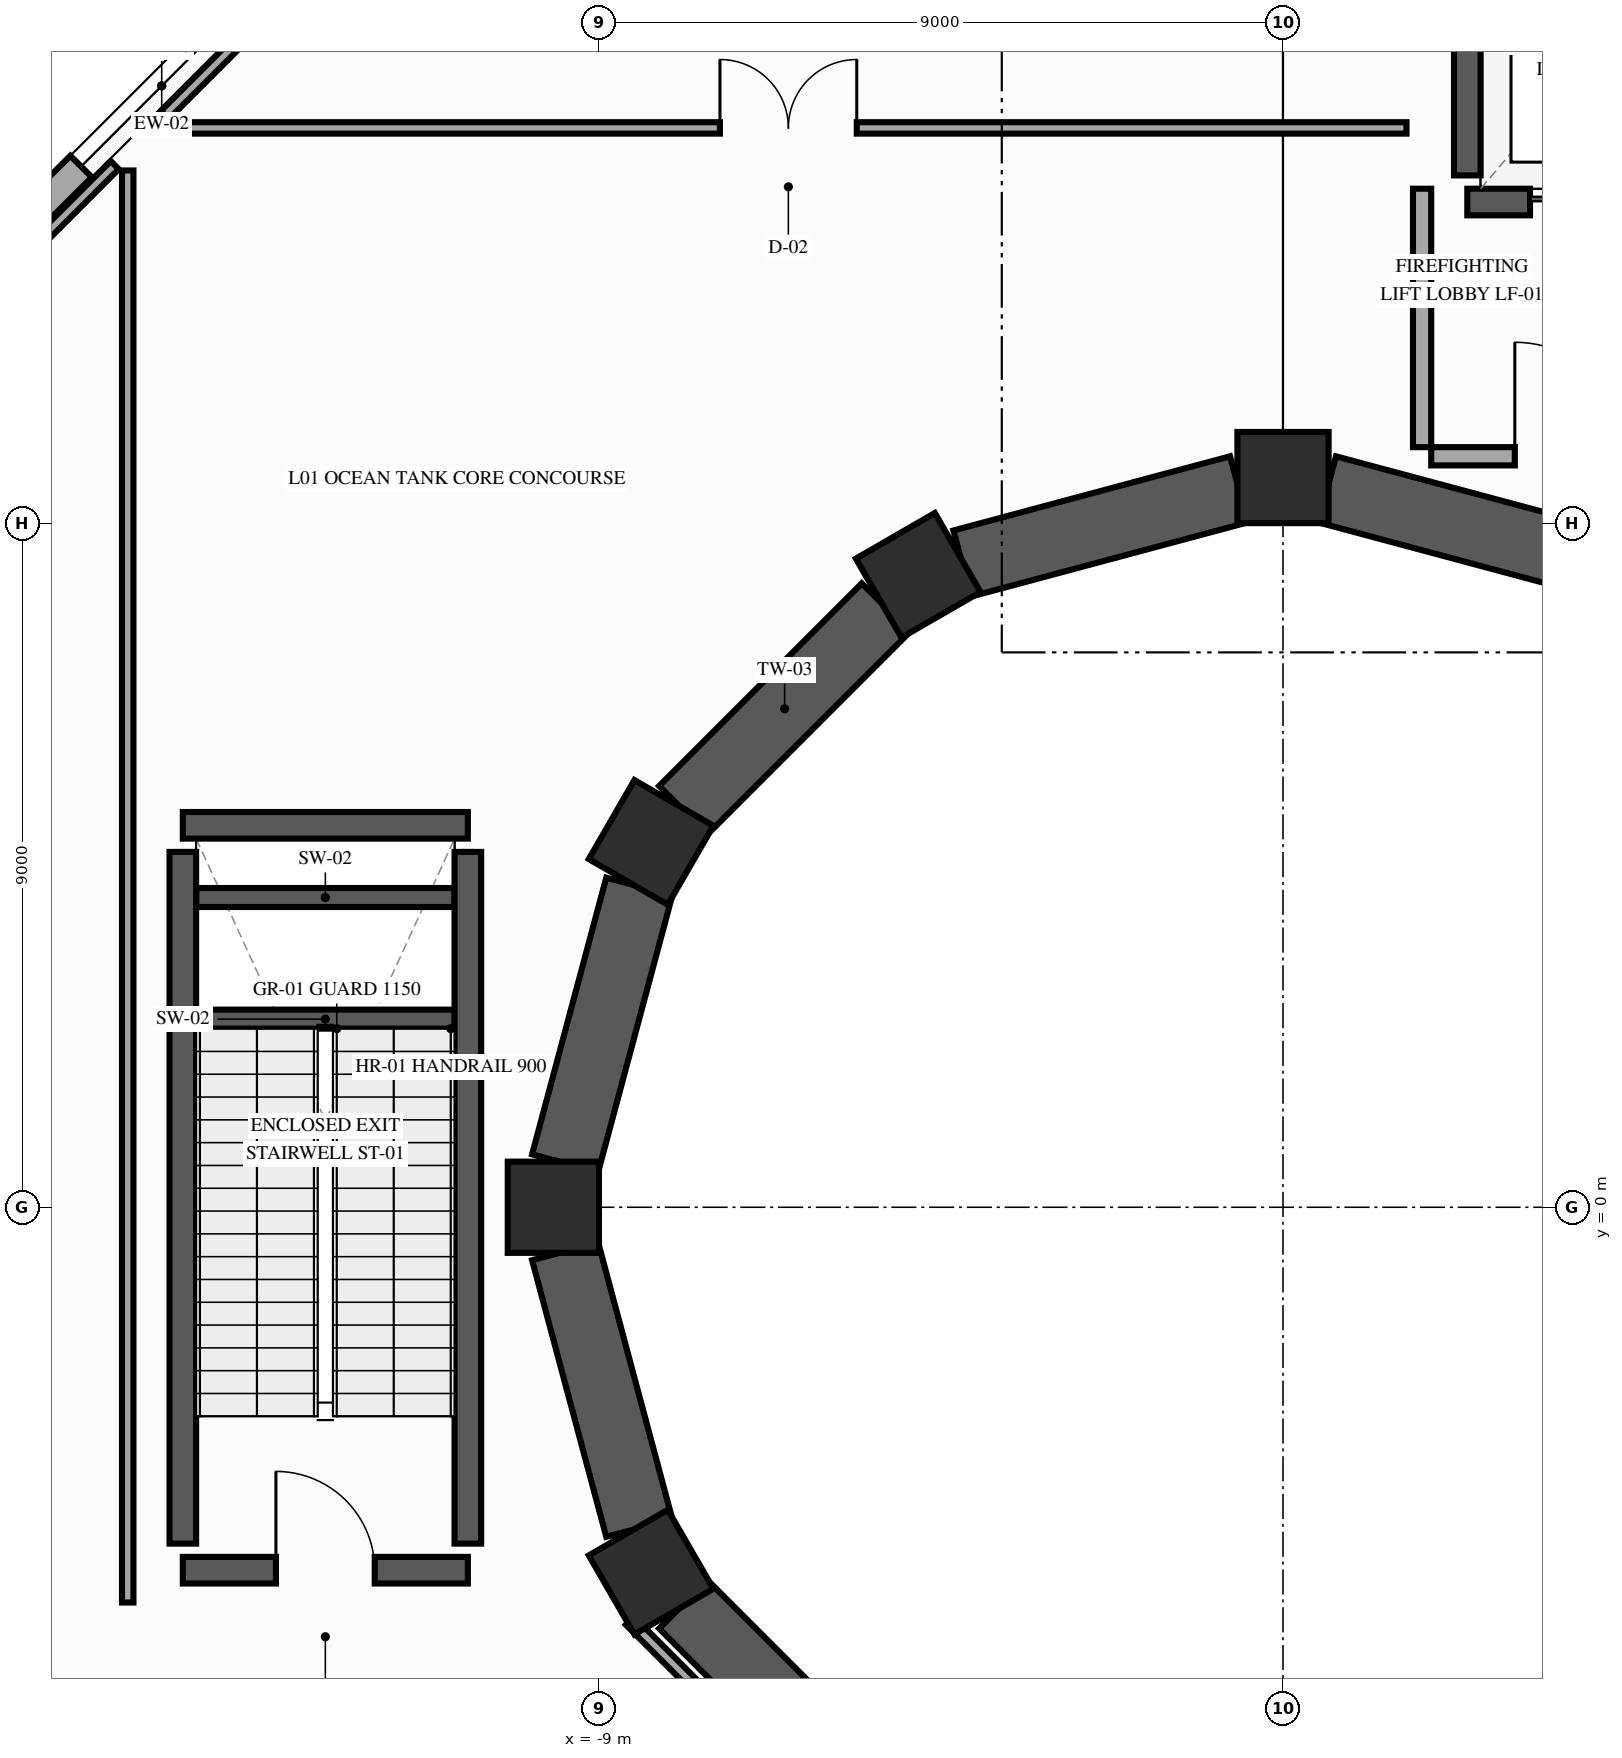
"""IFC4 building model, lengths in metres.
Left out: names, types, materials, properties, quantities, classifications, styles, units other than length and angle.
Written with IfcOpenShell. Run it as: python <this file> out.ifc"""

import sys

from ifc_helpers import new_model, si_unit, direction, frame, frame_2d, origin, origin_2d, place, context, subcontext, project, spatial, rectangle, extrude, element, fill, save


model = new_model("IFC4")
c1 = context("Model", 3, precision=1e-05, world=origin(), true_north=direction((0.0, 1.0)))
c2 = subcontext(c1, "Body", "Model", "MODEL_VIEW")
j1 = project(units=[si_unit("LENGTHUNIT", "METRE"), si_unit("PLANEANGLEUNIT", "RADIAN")], contexts=[c1])
p1 = place(None, origin())
s1 = spatial("IfcSite", under=j1, at=p1, CompositionType="ELEMENT")
p2 = place(p1, origin())
s2 = spatial("IfcBuilding", under=s1, at=p2, CompositionType="ELEMENT")
p3 = place(p2, frame((0.0, 0.0, 5.4)))
s3 = spatial("IfcBuildingStorey", under=s2, at=p3, CompositionType="ELEMENT", Elevation=5.4)
for number, where, z_axis, x_axis in (
    (1, (0.0, 9.6, 0.0), (0.0, 0.0, 1.0), (0.0, 1.0, 0.0)),
    (2, (-4.8, 8.314, 0.0), (0.0, 0.0, 1.0), (-0.5, 0.866, 0.0)),
    (3, (-8.314, 4.8, 0.0), (0.0, 0.0, 1.0), (-0.866, 0.5, 0.0)),
    (4, (-9.6, 0.0, 0.0), (0.0, 0.0, 1.0), (-1.0, 0.0, 0.0)),
    (5, (-8.314, -4.8, 0.0), (0.0, 0.0, 1.0), (-0.866, -0.5, 0.0)),
):
    element("IfcColumn", number, at=place(p3, frame(where, z_axis=z_axis, x_axis=x_axis)), inside=s3, PredefinedType="COLUMN", context=c2, shape_type="SweptSolid", body=[
        extrude(rectangle(XDim=1.2, YDim=1.2, at=origin_2d()), origin(), (0.0, 0.0, 1.0), 5.4),
    ])
for number, where, z_axis, x_axis in (
    (6, (4.22, 8.469, 0.0), (0.0, 0.0, 1.0), (-0.966, 0.259, 0.0)),
    (7, (-0.58, 9.445, 0.0), (0.0, 0.0, 1.0), (-0.966, -0.259, 0.0)),
):
    element("IfcWall", number, at=place(p3, frame(where, z_axis=z_axis, x_axis=x_axis)), inside=s3, PredefinedType="SHEAR", context=c2, shape_type="SweptSolid", body=[
        extrude(rectangle(XDim=3.769, YDim=0.9, at=frame_2d((1.884, 0.0))), origin(), (0.0, 0.0, 1.0), 5.14),
    ])
p4 = place(p3, frame((-5.224, 7.89, 0.0), z_axis=(0.0, 0.0, 1.0), x_axis=(-0.707106781187, -0.707106781187, 0.0)))
e8 = element("IfcWall", 8, at=p4, inside=s3, PredefinedType="SHEAR", context=c2, shape_type="SweptSolid", body=[
    extrude(rectangle(XDim=3.77, YDim=0.9, at=frame_2d((1.885, 0.0))), origin(), (0.0, 0.0, 1.0), 5.14),
])
for number, where, z_axis, x_axis in (
    (9, (-8.469, 4.22, 0.0), (0.0, 0.0, 1.0), (-0.259, -0.966, 0.0)),
    (10, (-9.445, -0.58, 0.0), (0.0, 0.0, 1.0), (0.259, -0.966, 0.0)),
):
    element("IfcWall", number, at=place(p3, frame(where, z_axis=z_axis, x_axis=x_axis)), inside=s3, PredefinedType="SHEAR", context=c2, shape_type="SweptSolid", body=[
        extrude(rectangle(XDim=3.769, YDim=0.9, at=frame_2d((1.884, 0.0))), origin(), (0.0, 0.0, 1.0), 5.14),
    ])
p5 = place(p3, frame((-7.89, -5.224, 0.0), z_axis=(0.0, 0.0, 1.0), x_axis=(0.707106781187, -0.707106781187, 0.0)))
e11 = element("IfcWall", 11, at=p5, inside=s3, PredefinedType="SHEAR", context=c2, shape_type="SweptSolid", body=[
    extrude(rectangle(XDim=3.77, YDim=0.9, at=frame_2d((1.885, 0.0))), origin(), (0.0, 0.0, 1.0), 5.14),
])
p6 = place(p3, frame((-18.215, 11.291, 0.0), z_axis=(0.0, 0.0, 1.0), x_axis=(0.707106781187, 0.707106781187, 0.0)))
e12 = element("IfcWall", 12, at=p6, inside=s3, PredefinedType="SOLIDWALL", context=c2, shape_type="SweptSolid", body=[
    extrude(rectangle(XDim=9.792, YDim=0.4, at=frame_2d((4.896, 0.0))), origin(), (0.0, 0.0, 1.0), 4.275),
])
p7 = place(p6, frame((3.396, 0.0, 0.9)))
e13 = element("IfcOpeningElement", 13, at=p7, cuts=e12, PredefinedType="OPENING", context=c2, shape_type="SweptSolid", body=[
    extrude(rectangle(XDim=3.0, YDim=2.0, at=frame_2d((1.5, 1.0))), frame((0.0, 0.21, 0.0), z_axis=(0.0, -1.0, 0.0), x_axis=(1.0, 0.0, 0.0)), (0.0, 0.0, 1.0), 0.42),
])
for number, where, z_axis, x_axis in (
    (14, (-14.3, 2.475, 0.0), (0.0, 0.0, 1.0), (1.0, 0.0, 0.0)),
    (15, (-14.3, 4.075, 0.0), (0.0, 0.0, 1.0), (1.0, 0.0, 0.0)),
):
    element("IfcWall", number, at=place(p3, frame(where, z_axis=z_axis, x_axis=x_axis)), inside=s3, PredefinedType="SHEAR", context=c2, shape_type="SweptSolid", body=[
        extrude(rectangle(XDim=3.4, YDim=0.25, at=frame_2d((1.7, 0.0))), origin(), (0.0, 0.0, 1.0), 2.5),
    ])
p8 = place(p3, frame((-14.475, -4.775, 0.0), z_axis=(0.0, 0.0, 1.0), x_axis=(1.0, 0.0, 0.0)))
e16 = element("IfcWall", 16, at=p8, inside=s3, PredefinedType="SHEAR", context=c2, shape_type="SweptSolid", body=[
    extrude(rectangle(XDim=3.75, YDim=0.35, at=frame_2d((1.875, 0.0))), origin(), (0.0, 0.0, 1.0), 5.15),
])
p9 = place(p8, frame((1.225, 0.0, 0.0)))
e17 = element("IfcOpeningElement", 17, at=p9, cuts=e16, PredefinedType="OPENING", context=c2, shape_type="SweptSolid", body=[
    extrude(rectangle(XDim=1.3, YDim=2.2, at=frame_2d((0.65, 1.1))), frame((0.0, 0.185, 0.0), z_axis=(0.0, -1.0, 0.0), x_axis=(1.0, 0.0, 0.0)), (0.0, 0.0, 1.0), 0.37),
])
p10 = place(p3, frame((-14.475, 5.025, 0.0), z_axis=(0.0, 0.0, 1.0), x_axis=(1.0, 0.0, 0.0)))
e18 = element("IfcWall", 18, at=p10, inside=s3, PredefinedType="SHEAR", context=c2, shape_type="SweptSolid", body=[
    extrude(rectangle(XDim=3.75, YDim=0.35, at=frame_2d((1.875, 0.0))), origin(), (0.0, 0.0, 1.0), 5.15),
])
for number, where, z_axis, x_axis in (
    (19, (-14.475, -4.425, 0.0), (0.0, 0.0, 1.0), (0.0, 1.0, 0.0)),
    (20, (-10.725, -4.425, 0.0), (0.0, 0.0, 1.0), (0.0, 1.0, 0.0)),
):
    element("IfcWall", number, at=place(p3, frame(where, z_axis=z_axis, x_axis=x_axis)), inside=s3, PredefinedType="SHEAR", context=c2, shape_type="SweptSolid", body=[
        extrude(rectangle(XDim=9.1, YDim=0.35, at=frame_2d((4.55, 0.0))), origin(), (0.0, 0.0, 1.0), 5.15),
    ])
p11 = place(p3, frame((2.425, 13.225, 0.0), z_axis=(0.0, 0.0, 1.0), x_axis=(1.0, 0.0, 0.0)))
e21 = element("IfcWall", 21, at=p11, inside=s3, PredefinedType="SHEAR", context=c2, shape_type="SweptSolid", body=[
    extrude(rectangle(XDim=2.75, YDim=0.35, at=frame_2d((1.375, 0.0))), origin(), (0.0, 0.0, 1.0), 5.15),
])
p12 = place(p11, frame((0.825, 0.0, 0.0)))
e22 = element("IfcOpeningElement", 22, at=p12, cuts=e21, PredefinedType="OPENING", context=c2, shape_type="SweptSolid", body=[
    extrude(rectangle(XDim=1.1, YDim=2.2, at=frame_2d((0.55, 1.1))), frame((0.0, 0.185, 0.0), z_axis=(0.0, -1.0, 0.0), x_axis=(1.0, 0.0, 0.0)), (0.0, 0.0, 1.0), 0.37),
])
p13 = place(p3, frame((2.425, 13.575, 0.0), z_axis=(0.0, 0.0, 1.0), x_axis=(0.0, 1.0, 0.0)))
e23 = element("IfcWall", 23, at=p13, inside=s3, PredefinedType="SHEAR", context=c2, shape_type="SweptSolid", body=[
    extrude(rectangle(XDim=2.45, YDim=0.35, at=frame_2d((1.225, 0.0))), origin(), (0.0, 0.0, 1.0), 5.15),
])
p14 = place(p3, frame((1.95, 9.88, 0.0), z_axis=(0.0, 0.0, 1.0), x_axis=(1.0, 0.0, 0.0)))
e24 = element("IfcWall", 24, at=p14, inside=s3, PredefinedType="PARTITIONING", context=c2, shape_type="SweptSolid", body=[
    extrude(rectangle(XDim=3.7, YDim=0.24, at=frame_2d((1.85, 0.0))), origin(), (0.0, 0.0, 1.0), 4.525),
])
p15 = place(p14, frame((1.1, 0.0, 0.0)))
e25 = element("IfcOpeningElement", 25, at=p15, cuts=e24, PredefinedType="OPENING", context=c2, shape_type="SweptSolid", body=[
    extrude(rectangle(XDim=1.5, YDim=2.2, at=frame_2d((0.75, 1.1))), frame((0.0, 0.13, 0.0), z_axis=(0.0, -1.0, 0.0), x_axis=(1.0, 0.0, 0.0)), (0.0, 0.0, 1.0), 0.26),
])
p16 = place(p3, frame((1.83, 10.0, 0.0), z_axis=(0.0, 0.0, 1.0), x_axis=(0.0, 1.0, 0.0)))
e26 = element("IfcWall", 26, at=p16, inside=s3, PredefinedType="PARTITIONING", context=c2, shape_type="SweptSolid", body=[
    extrude(rectangle(XDim=3.4, YDim=0.24, at=frame_2d((1.7, 0.0))), origin(), (0.0, 0.0, 1.0), 5.1),
])
p17 = place(p3, frame((-5.44, -8.593, 0.0), z_axis=(0.0, 0.0, 1.0), x_axis=(-0.707106781187, 0.707106781187, 0.0)))
e27 = element("IfcWall", 27, at=p17, inside=s3, PredefinedType="PARTITIONING", context=c2, shape_type="SweptSolid", body=[
    extrude(rectangle(XDim=4.459, YDim=0.15, at=frame_2d((2.229, 0.0))), origin(), (0.0, 0.0, 1.0), 4.525),
])
p18 = place(p3, frame((-15.2, -5.2, 0.0), z_axis=(0.0, 0.0, 1.0), x_axis=(0.0, 1.0, 0.0)))
e28 = element("IfcWall", 28, at=p18, inside=s3, PredefinedType="PARTITIONING", context=c2, shape_type="SweptSolid", body=[
    extrude(rectangle(XDim=18.84, YDim=0.15, at=frame_2d((9.42, 0.0))), origin(), (0.0, 0.0, 1.0), 4.275),
])
p19 = place(p3, frame((-15.371, 13.711, 0.0), z_axis=(0.0, 0.0, 1.0), x_axis=(-0.706972707094, -0.707240829862, 0.0)))
e29 = element("IfcWall", 29, at=p19, inside=s3, PredefinedType="PARTITIONING", context=c2, shape_type="SweptSolid", body=[
    extrude(rectangle(XDim=3.642, YDim=0.15, at=frame_2d((1.821, 0.0))), origin(), (0.0, 0.0, 1.0), 4.275),
])
p20 = place(p3, frame((-14.64, 14.2, 0.0), z_axis=(0.0, 0.0, 1.0), x_axis=(1.0, 0.0, 0.0)))
e30 = element("IfcWall", 30, at=p20, inside=s3, PredefinedType="PARTITIONING", context=c2, shape_type="SweptSolid", body=[
    extrude(rectangle(XDim=16.265, YDim=0.15, at=frame_2d((8.132, 0.0))), origin(), (0.0, 0.0, 1.0), 4.275),
])
p21 = place(p20, frame((7.232, 0.0, 0.0)))
e31 = element("IfcOpeningElement", 31, at=p21, cuts=e30, PredefinedType="OPENING", context=c2, shape_type="SweptSolid", body=[
    extrude(rectangle(XDim=1.8, YDim=2.3, at=frame_2d((0.9, 1.15))), frame((0.0, 0.085, 0.0), z_axis=(0.0, -1.0, 0.0), x_axis=(1.0, 0.0, 0.0)), (0.0, 0.0, 1.0), 0.17),
])
p22 = place(p3, frame((-11.136, 17.946, 0.0), z_axis=(0.0, 0.0, 1.0), x_axis=(-0.707106781187, -0.707106781187, 0.0)))
e32 = element("IfcWall", 32, at=p22, inside=s3, PredefinedType="PARTITIONING", context=c2, shape_type="SweptSolid", body=[
    extrude(rectangle(XDim=5.056, YDim=0.15, at=frame_2d((2.528, 0.0))), origin(), (0.0, 0.0, 1.0), 4.275),
])
p23 = place(p7, origin())
e33 = element("IfcWindow", 33, at=p23, inside=s3, PartitioningType="SINGLE_PANEL", PredefinedType="WINDOW", context=c2, shape_type="SweptSolid", body=[
    extrude(rectangle(XDim=3.0, YDim=2.0, at=frame_2d((1.5, 1.0))), frame((0.0, 0.03, 0.0), z_axis=(0.0, -1.0, 0.0), x_axis=(1.0, 0.0, 0.0)), (0.0, 0.0, 1.0), 0.06),
])
fill(e13, e33)
p24 = place(p9, origin())
e34 = element("IfcDoor", 34, at=p24, inside=s3, OperationType="SINGLE_SWING_LEFT", PredefinedType="DOOR", context=c2, shape_type="SweptSolid", body=[
    extrude(rectangle(XDim=1.3, YDim=2.2, at=frame_2d((0.65, 1.1))), frame((0.0, 0.025, 0.0), z_axis=(0.0, -1.0, 0.0), x_axis=(1.0, 0.0, 0.0)), (0.0, 0.0, 1.0), 0.05),
])
fill(e17, e34)
p25 = place(p12, origin())
e35 = element("IfcDoor", 35, at=p25, inside=s3, OperationType="DOUBLE_DOOR_SLIDING", PredefinedType="DOOR", context=c2, shape_type="SweptSolid", body=[
    extrude(rectangle(XDim=1.1, YDim=2.2, at=frame_2d((0.55, 1.1))), frame((0.0, 0.025, 0.0), z_axis=(0.0, -1.0, 0.0), x_axis=(1.0, 0.0, 0.0)), (0.0, 0.0, 1.0), 0.05),
])
fill(e22, e35)
p26 = place(p15, origin())
e36 = element("IfcDoor", 36, at=p26, inside=s3, OperationType="SINGLE_SWING_LEFT", PredefinedType="DOOR", context=c2, shape_type="SweptSolid", body=[
    extrude(rectangle(XDim=1.5, YDim=2.2, at=frame_2d((0.75, 1.1))), frame((0.0, 0.025, 0.0), z_axis=(0.0, -1.0, 0.0), x_axis=(1.0, 0.0, 0.0)), (0.0, 0.0, 1.0), 0.05),
])
fill(e25, e36)
p27 = place(p21, origin())
e37 = element("IfcDoor", 37, at=p27, inside=s3, OperationType="DOUBLE_DOOR_SINGLE_SWING", PredefinedType="DOOR", context=c2, shape_type="SweptSolid", body=[
    extrude(rectangle(XDim=1.8, YDim=2.3, at=frame_2d((0.9, 1.15))), frame((0.0, 0.025, 0.0), z_axis=(0.0, -1.0, 0.0), x_axis=(1.0, 0.0, 0.0)), (0.0, 0.0, 1.0), 0.05),
])
fill(e31, e37)
save(model, sys.argv[1])
